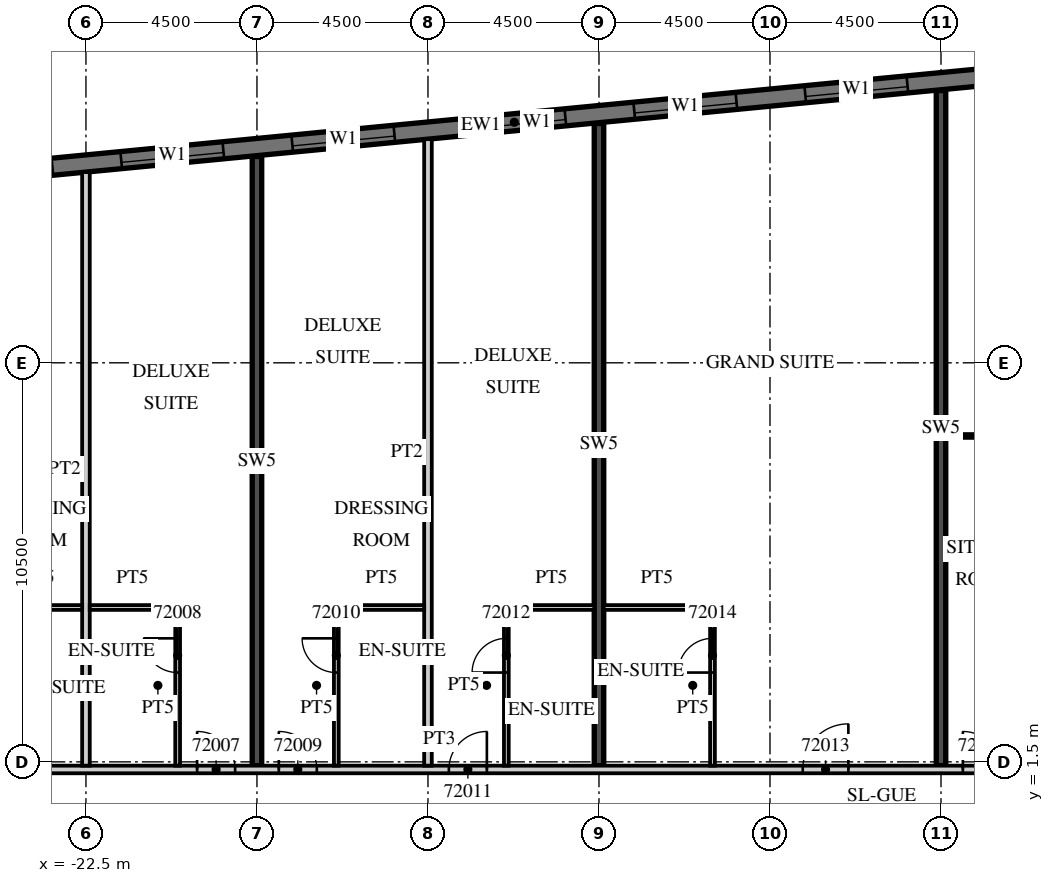
"""IFC4 building model, lengths in metres.
Left out: names, types, materials, properties, quantities, classifications, styles, units other than length and angle.
Written with IfcOpenShell. Run it as: python <this file> out.ifc"""

import sys

from ifc_helpers import new_model, si_unit, direction, frame, frame_2d, origin, place, context, subcontext, project, spatial, rectangle, extrude, element, fill, save


model = new_model("IFC4")
c1 = context("Model", 3, precision=1e-05, world=origin(), true_north=direction((0.0, 1.0)))
c2 = subcontext(c1, "Body", "Model", "MODEL_VIEW")
j1 = project(units=[si_unit("LENGTHUNIT", "METRE"), si_unit("PLANEANGLEUNIT", "RADIAN")], contexts=[c1])
p1 = place(None, origin())
s1 = spatial("IfcSite", under=j1, at=p1, CompositionType="ELEMENT")
p2 = place(p1, origin())
s2 = spatial("IfcBuilding", under=s1, at=p2, CompositionType="ELEMENT")
p3 = place(p2, frame((0.0, 0.0, 288.3)))
s3 = spatial("IfcBuildingStorey", under=s2, at=p3, CompositionType="ELEMENT", Elevation=288.3)
p4 = place(p3, frame((-18.0, 1.4, 0.0), z_axis=(0.0, 0.0, 1.0), x_axis=(0.0, 1.0, 0.0)))
e1 = element("IfcWall", 1, at=p4, inside=s3, PredefinedType="SHEAR", context=c2, shape_type="SweptSolid", body=[
    extrude(rectangle(XDim=16.03, YDim=0.25, at=frame_2d((8.015, 0.0))), origin(), (0.0, 0.0, 1.0), 3.3),
])
p5 = place(p3, frame((-9.0, 1.4, 0.0), z_axis=(0.0, 0.0, 1.0), x_axis=(0.0, 1.0, 0.0)))
e2 = element("IfcWall", 2, at=p5, inside=s3, PredefinedType="SHEAR", context=c2, shape_type="SweptSolid", body=[
    extrude(rectangle(XDim=16.896, YDim=0.25, at=frame_2d((8.448, 0.0))), origin(), (0.0, 0.0, 1.0), 3.3),
])
p6 = place(p3, frame((0.0, 1.4, 0.0), z_axis=(0.0, 0.0, 1.0), x_axis=(0.0, 1.0, 0.0)))
e3 = element("IfcWall", 3, at=p6, inside=s3, PredefinedType="SHEAR", context=c2, shape_type="SweptSolid", body=[
    extrude(rectangle(XDim=17.763, YDim=0.25, at=frame_2d((8.881, 0.0))), origin(), (0.0, 0.0, 1.0), 3.3),
])
p7 = place(p3, frame((13.521, 20.713, 0.0), z_axis=(0.0, 0.0, 1.0), x_axis=(-0.995396277313, -0.095844932638, 0.0)))
e4 = element("IfcWall", 4, at=p7, inside=s3, PredefinedType="SOLIDWALL", context=c2, shape_type="SweptSolid", body=[
    extrude(rectangle(XDim=51.495, YDim=0.45, at=frame_2d((25.748, 0.0))), origin(), (0.0, 0.0, 1.0), 3.02),
])
p8 = place(p7, frame((0.91, 0.0, 0.45)))
e5 = element("IfcOpeningElement", 5, at=p8, cuts=e4, PredefinedType="OPENING", context=c2, shape_type="SweptSolid", body=[
    extrude(rectangle(XDim=2.7, YDim=2.25, at=frame_2d((1.35, 1.125))), frame((0.0, 0.235, 0.0), z_axis=(0.0, -1.0, 0.0), x_axis=(1.0, 0.0, 0.0)), (0.0, 0.0, 1.0), 0.47),
])
p9 = place(p7, frame((5.431, 0.0, 0.45)))
e6 = element("IfcOpeningElement", 6, at=p9, cuts=e4, PredefinedType="OPENING", context=c2, shape_type="SweptSolid", body=[
    extrude(rectangle(XDim=2.7, YDim=2.25, at=frame_2d((1.35, 1.125))), frame((0.0, 0.235, 0.0), z_axis=(0.0, -1.0, 0.0), x_axis=(1.0, 0.0, 0.0)), (0.0, 0.0, 1.0), 0.47),
])
p10 = place(p7, frame((9.952, 0.0, 0.45)))
e7 = element("IfcOpeningElement", 7, at=p10, cuts=e4, PredefinedType="OPENING", context=c2, shape_type="SweptSolid", body=[
    extrude(rectangle(XDim=2.7, YDim=2.25, at=frame_2d((1.35, 1.125))), frame((0.0, 0.235, 0.0), z_axis=(0.0, -1.0, 0.0), x_axis=(1.0, 0.0, 0.0)), (0.0, 0.0, 1.0), 0.47),
])
p11 = place(p7, frame((14.473, 0.0, 0.45)))
e8 = element("IfcOpeningElement", 8, at=p11, cuts=e4, PredefinedType="OPENING", context=c2, shape_type="SweptSolid", body=[
    extrude(rectangle(XDim=2.7, YDim=2.25, at=frame_2d((1.35, 1.125))), frame((0.0, 0.235, 0.0), z_axis=(0.0, -1.0, 0.0), x_axis=(1.0, 0.0, 0.0)), (0.0, 0.0, 1.0), 0.47),
])
p12 = place(p7, frame((18.994, 0.0, 0.45)))
e9 = element("IfcOpeningElement", 9, at=p12, cuts=e4, PredefinedType="OPENING", context=c2, shape_type="SweptSolid", body=[
    extrude(rectangle(XDim=2.7, YDim=2.25, at=frame_2d((1.35, 1.125))), frame((0.0, 0.235, 0.0), z_axis=(0.0, -1.0, 0.0), x_axis=(1.0, 0.0, 0.0)), (0.0, 0.0, 1.0), 0.47),
])
p13 = place(p7, frame((23.514, 0.0, 0.45)))
e10 = element("IfcOpeningElement", 10, at=p13, cuts=e4, PredefinedType="OPENING", context=c2, shape_type="SweptSolid", body=[
    extrude(rectangle(XDim=2.7, YDim=2.25, at=frame_2d((1.35, 1.125))), frame((0.0, 0.235, 0.0), z_axis=(0.0, -1.0, 0.0), x_axis=(1.0, 0.0, 0.0)), (0.0, 0.0, 1.0), 0.47),
])
p14 = place(p7, frame((28.035, 0.0, 0.45)))
e11 = element("IfcOpeningElement", 11, at=p14, cuts=e4, PredefinedType="OPENING", context=c2, shape_type="SweptSolid", body=[
    extrude(rectangle(XDim=2.7, YDim=2.25, at=frame_2d((1.35, 1.125))), frame((0.0, 0.235, 0.0), z_axis=(0.0, -1.0, 0.0), x_axis=(1.0, 0.0, 0.0)), (0.0, 0.0, 1.0), 0.47),
])
p15 = place(p7, frame((32.556, 0.0, 0.45)))
e12 = element("IfcOpeningElement", 12, at=p15, cuts=e4, PredefinedType="OPENING", context=c2, shape_type="SweptSolid", body=[
    extrude(rectangle(XDim=2.7, YDim=2.25, at=frame_2d((1.35, 1.125))), frame((0.0, 0.235, 0.0), z_axis=(0.0, -1.0, 0.0), x_axis=(1.0, 0.0, 0.0)), (0.0, 0.0, 1.0), 0.47),
])
p16 = place(p7, frame((37.077, 0.0, 0.45)))
e13 = element("IfcOpeningElement", 13, at=p16, cuts=e4, PredefinedType="OPENING", context=c2, shape_type="SweptSolid", body=[
    extrude(rectangle(XDim=2.7, YDim=2.25, at=frame_2d((1.35, 1.125))), frame((0.0, 0.235, 0.0), z_axis=(0.0, -1.0, 0.0), x_axis=(1.0, 0.0, 0.0)), (0.0, 0.0, 1.0), 0.47),
])
p17 = place(p7, frame((41.598, 0.0, 0.45)))
e14 = element("IfcOpeningElement", 14, at=p17, cuts=e4, PredefinedType="OPENING", context=c2, shape_type="SweptSolid", body=[
    extrude(rectangle(XDim=2.7, YDim=2.25, at=frame_2d((1.35, 1.125))), frame((0.0, 0.235, 0.0), z_axis=(0.0, -1.0, 0.0), x_axis=(1.0, 0.0, 0.0)), (0.0, 0.0, 1.0), 0.47),
])
p18 = place(p7, frame((46.118, 0.0, 0.45)))
e15 = element("IfcOpeningElement", 15, at=p18, cuts=e4, PredefinedType="OPENING", context=c2, shape_type="SweptSolid", body=[
    extrude(rectangle(XDim=2.7, YDim=2.25, at=frame_2d((1.35, 1.125))), frame((0.0, 0.235, 0.0), z_axis=(0.0, -1.0, 0.0), x_axis=(1.0, 0.0, 0.0)), (0.0, 0.0, 1.0), 0.47),
])
p19 = place(p3, frame((-39.909, 1.3, 0.0), z_axis=(0.0, 0.0, 1.0), x_axis=(1.0, 0.0, 0.0)))
e16 = element("IfcWall", 16, at=p19, inside=s3, PredefinedType="PARTITIONING", context=c2, shape_type="SweptSolid", body=[
    extrude(rectangle(XDim=53.409, YDim=0.2, at=frame_2d((26.705, 0.0))), origin(), (0.0, 0.0, 1.0), 3.02),
])
p20 = place(p19, frame((0.255, 0.0, 0.0)))
e17 = element("IfcOpeningElement", 17, at=p20, cuts=e16, PredefinedType="OPENING", context=c2, shape_type="SweptSolid", body=[
    extrude(rectangle(XDim=0.9, YDim=2.1, at=frame_2d((0.45, 1.05))), frame((0.0, 0.11, 0.0), z_axis=(0.0, -1.0, 0.0), x_axis=(1.0, 0.0, 0.0)), (0.0, 0.0, 1.0), 0.22),
])
p21 = place(p19, frame((6.347, 0.0, 0.0)))
e18 = element("IfcOpeningElement", 18, at=p21, cuts=e16, PredefinedType="OPENING", context=c2, shape_type="SweptSolid", body=[
    extrude(rectangle(XDim=1.2, YDim=2.1, at=frame_2d((0.6, 1.05))), frame((0.0, 0.11, 0.0), z_axis=(0.0, -1.0, 0.0), x_axis=(1.0, 0.0, 0.0)), (0.0, 0.0, 1.0), 0.22),
])
p22 = place(p19, frame((13.484, 0.0, 0.0)))
e19 = element("IfcOpeningElement", 19, at=p22, cuts=e16, PredefinedType="OPENING", context=c2, shape_type="SweptSolid", body=[
    extrude(rectangle(XDim=1.0, YDim=2.1, at=frame_2d((0.5, 1.05))), frame((0.0, 0.11, 0.0), z_axis=(0.0, -1.0, 0.0), x_axis=(1.0, 0.0, 0.0)), (0.0, 0.0, 1.0), 0.22),
])
p23 = place(p19, frame((20.334, 0.0, 0.0)))
e20 = element("IfcOpeningElement", 20, at=p23, cuts=e16, PredefinedType="OPENING", context=c2, shape_type="SweptSolid", body=[
    extrude(rectangle(XDim=1.0, YDim=2.1, at=frame_2d((0.5, 1.05))), frame((0.0, 0.11, 0.0), z_axis=(0.0, -1.0, 0.0), x_axis=(1.0, 0.0, 0.0)), (0.0, 0.0, 1.0), 0.22),
])
p24 = place(p19, frame((22.484, 0.0, 0.0)))
e21 = element("IfcOpeningElement", 21, at=p24, cuts=e16, PredefinedType="OPENING", context=c2, shape_type="SweptSolid", body=[
    extrude(rectangle(XDim=1.0, YDim=2.1, at=frame_2d((0.5, 1.05))), frame((0.0, 0.11, 0.0), z_axis=(0.0, -1.0, 0.0), x_axis=(1.0, 0.0, 0.0)), (0.0, 0.0, 1.0), 0.22),
])
p25 = place(p19, frame((26.959, 0.0, 0.0)))
e22 = element("IfcOpeningElement", 22, at=p25, cuts=e16, PredefinedType="OPENING", context=c2, shape_type="SweptSolid", body=[
    extrude(rectangle(XDim=1.0, YDim=2.1, at=frame_2d((0.5, 1.05))), frame((0.0, 0.11, 0.0), z_axis=(0.0, -1.0, 0.0), x_axis=(1.0, 0.0, 0.0)), (0.0, 0.0, 1.0), 0.22),
])
p26 = place(p19, frame((36.271, 0.0, 0.0)))
e23 = element("IfcOpeningElement", 23, at=p26, cuts=e16, PredefinedType="OPENING", context=c2, shape_type="SweptSolid", body=[
    extrude(rectangle(XDim=1.2, YDim=2.1, at=frame_2d((0.6, 1.05))), frame((0.0, 0.11, 0.0), z_axis=(0.0, -1.0, 0.0), x_axis=(1.0, 0.0, 0.0)), (0.0, 0.0, 1.0), 0.22),
])
p27 = place(p19, frame((40.484, 0.0, 0.0)))
e24 = element("IfcOpeningElement", 24, at=p27, cuts=e16, PredefinedType="OPENING", context=c2, shape_type="SweptSolid", body=[
    extrude(rectangle(XDim=1.0, YDim=2.1, at=frame_2d((0.5, 1.05))), frame((0.0, 0.11, 0.0), z_axis=(0.0, -1.0, 0.0), x_axis=(1.0, 0.0, 0.0)), (0.0, 0.0, 1.0), 0.22),
])
p28 = place(p19, frame((44.959, 0.0, 0.0)))
e25 = element("IfcOpeningElement", 25, at=p28, cuts=e16, PredefinedType="OPENING", context=c2, shape_type="SweptSolid", body=[
    extrude(rectangle(XDim=1.0, YDim=2.1, at=frame_2d((0.5, 1.05))), frame((0.0, 0.11, 0.0), z_axis=(0.0, -1.0, 0.0), x_axis=(1.0, 0.0, 0.0)), (0.0, 0.0, 1.0), 0.22),
])
p29 = place(p19, frame((51.834, 0.0, 0.0)))
e26 = element("IfcOpeningElement", 26, at=p29, cuts=e16, PredefinedType="OPENING", context=c2, shape_type="SweptSolid", body=[
    extrude(rectangle(XDim=1.0, YDim=2.1, at=frame_2d((0.5, 1.05))), frame((0.0, 0.11, 0.0), z_axis=(0.0, -1.0, 0.0), x_axis=(1.0, 0.0, 0.0)), (0.0, 0.0, 1.0), 0.22),
])
p30 = place(p3, frame((-22.5, 1.4, 0.0), z_axis=(0.0, 0.0, 1.0), x_axis=(0.0, 1.0, 0.0)))
e27 = element("IfcWall", 27, at=p30, inside=s3, PredefinedType="PARTITIONING", context=c2, shape_type="SweptSolid", body=[
    extrude(rectangle(XDim=15.618, YDim=0.2, at=frame_2d((7.809, 0.0))), origin(), (0.0, 0.0, 1.0), 3.02),
])
p31 = place(p3, frame((-24.85, 5.562, 0.0), z_axis=(0.0, 0.0, 1.0), x_axis=(1.0, 0.0, 0.0)))
e28 = element("IfcWall", 28, at=p31, inside=s3, PredefinedType="PARTITIONING", context=c2, shape_type="SweptSolid", body=[
    extrude(rectangle(XDim=2.25, YDim=0.125, at=frame_2d((1.125, 0.0))), origin(), (0.0, 0.0, 1.0), 3.02),
])
p32 = place(p3, frame((-20.087, 1.4, 0.0), z_axis=(0.0, 0.0, 1.0), x_axis=(0.0, 1.0, 0.0)))
e29 = element("IfcWall", 29, at=p32, inside=s3, PredefinedType="PARTITIONING", context=c2, shape_type="SweptSolid", body=[
    extrude(rectangle(XDim=4.225, YDim=0.125, at=frame_2d((2.113, 0.0))), origin(), (0.0, 0.0, 1.0), 3.02),
])
p33 = place(p32, frame((2.45, 0.0, 0.0)))
e30 = element("IfcOpeningElement", 30, at=p33, cuts=e29, PredefinedType="OPENING", context=c2, shape_type="SweptSolid", body=[
    extrude(rectangle(XDim=0.9, YDim=2.1, at=frame_2d((0.45, 1.05))), frame((0.0, 0.073, 0.0), z_axis=(0.0, -1.0, 0.0), x_axis=(1.0, 0.0, 0.0)), (0.0, 0.0, 1.0), 0.145),
])
p34 = place(p3, frame((-22.4, 5.562, 0.0), z_axis=(0.0, 0.0, 1.0), x_axis=(1.0, 0.0, 0.0)))
e31 = element("IfcWall", 31, at=p34, inside=s3, PredefinedType="PARTITIONING", context=c2, shape_type="SweptSolid", body=[
    extrude(rectangle(XDim=2.25, YDim=0.125, at=frame_2d((1.125, 0.0))), origin(), (0.0, 0.0, 1.0), 3.02),
])
p35 = place(p3, frame((-13.5, 1.4, 0.0), z_axis=(0.0, 0.0, 1.0), x_axis=(0.0, 1.0, 0.0)))
e32 = element("IfcWall", 32, at=p35, inside=s3, PredefinedType="PARTITIONING", context=c2, shape_type="SweptSolid", body=[
    extrude(rectangle(XDim=16.485, YDim=0.2, at=frame_2d((8.243, 0.0))), origin(), (0.0, 0.0, 1.0), 3.02),
])
p36 = place(p3, frame((-15.912, 1.4, 0.0), z_axis=(0.0, 0.0, 1.0), x_axis=(0.0, 1.0, 0.0)))
e33 = element("IfcWall", 33, at=p36, inside=s3, PredefinedType="PARTITIONING", context=c2, shape_type="SweptSolid", body=[
    extrude(rectangle(XDim=4.225, YDim=0.125, at=frame_2d((2.113, 0.0))), origin(), (0.0, 0.0, 1.0), 3.02),
])
p37 = place(p36, frame((2.45, 0.0, 0.0)))
e34 = element("IfcOpeningElement", 34, at=p37, cuts=e33, PredefinedType="OPENING", context=c2, shape_type="SweptSolid", body=[
    extrude(rectangle(XDim=0.9, YDim=2.1, at=frame_2d((0.45, 1.05))), frame((0.0, 0.073, 0.0), z_axis=(0.0, -1.0, 0.0), x_axis=(1.0, 0.0, 0.0)), (0.0, 0.0, 1.0), 0.145),
])
p38 = place(p3, frame((-15.85, 5.562, 0.0), z_axis=(0.0, 0.0, 1.0), x_axis=(1.0, 0.0, 0.0)))
e35 = element("IfcWall", 35, at=p38, inside=s3, PredefinedType="PARTITIONING", context=c2, shape_type="SweptSolid", body=[
    extrude(rectangle(XDim=2.25, YDim=0.125, at=frame_2d((1.125, 0.0))), origin(), (0.0, 0.0, 1.0), 3.02),
])
p39 = place(p3, frame((-11.438, 1.4, 0.0), z_axis=(0.0, 0.0, 1.0), x_axis=(0.0, 1.0, 0.0)))
e36 = element("IfcWall", 36, at=p39, inside=s3, PredefinedType="PARTITIONING", context=c2, shape_type="SweptSolid", body=[
    extrude(rectangle(XDim=4.225, YDim=0.125, at=frame_2d((2.113, 0.0))), origin(), (0.0, 0.0, 1.0), 3.02),
])
p40 = place(p39, frame((2.45, 0.0, 0.0)))
e37 = element("IfcOpeningElement", 37, at=p40, cuts=e36, PredefinedType="OPENING", context=c2, shape_type="SweptSolid", body=[
    extrude(rectangle(XDim=0.9, YDim=2.1, at=frame_2d((0.45, 1.05))), frame((0.0, 0.073, 0.0), z_axis=(0.0, -1.0, 0.0), x_axis=(1.0, 0.0, 0.0)), (0.0, 0.0, 1.0), 0.145),
])
p41 = place(p3, frame((-11.375, 5.562, 0.0), z_axis=(0.0, 0.0, 1.0), x_axis=(1.0, 0.0, 0.0)))
e38 = element("IfcWall", 38, at=p41, inside=s3, PredefinedType="PARTITIONING", context=c2, shape_type="SweptSolid", body=[
    extrude(rectangle(XDim=2.25, YDim=0.125, at=frame_2d((1.125, 0.0))), origin(), (0.0, 0.0, 1.0), 3.02),
])
p42 = place(p3, frame((-6.013, 1.4, 0.0), z_axis=(0.0, 0.0, 1.0), x_axis=(0.0, 1.0, 0.0)))
e39 = element("IfcWall", 39, at=p42, inside=s3, PredefinedType="PARTITIONING", context=c2, shape_type="SweptSolid", body=[
    extrude(rectangle(XDim=4.225, YDim=0.125, at=frame_2d((2.113, 0.0))), origin(), (0.0, 0.0, 1.0), 3.02),
])
p43 = place(p42, frame((2.45, 0.0, 0.0)))
e40 = element("IfcOpeningElement", 40, at=p43, cuts=e39, PredefinedType="OPENING", context=c2, shape_type="SweptSolid", body=[
    extrude(rectangle(XDim=0.9, YDim=2.1, at=frame_2d((0.45, 1.05))), frame((0.0, 0.073, 0.0), z_axis=(0.0, -1.0, 0.0), x_axis=(1.0, 0.0, 0.0)), (0.0, 0.0, 1.0), 0.145),
])
p44 = place(p3, frame((-8.875, 5.562, 0.0), z_axis=(0.0, 0.0, 1.0), x_axis=(1.0, 0.0, 0.0)))
e41 = element("IfcWall", 41, at=p44, inside=s3, PredefinedType="PARTITIONING", context=c2, shape_type="SweptSolid", body=[
    extrude(rectangle(XDim=2.8, YDim=0.125, at=frame_2d((1.4, 0.0))), origin(), (0.0, 0.0, 1.0), 3.02),
])
p45 = place(p3, frame((0.125, 10.075, 0.0), z_axis=(0.0, 0.0, 1.0), x_axis=(1.0, 0.0, 0.0)))
e42 = element("IfcWall", 42, at=p45, inside=s3, PredefinedType="PARTITIONING", context=c2, shape_type="SweptSolid", body=[
    extrude(rectangle(XDim=4.275, YDim=0.1, at=frame_2d((2.137, 0.0))), origin(), (0.0, 0.0, 1.0), 3.02),
])
p46 = place(p45, frame((1.988, 0.0, 0.0)))
e43 = element("IfcOpeningElement", 43, at=p46, cuts=e42, PredefinedType="OPENING", context=c2, shape_type="SweptSolid", body=[
    extrude(rectangle(XDim=1.5, YDim=2.1, at=frame_2d((0.75, 1.05))), frame((0.0, 0.06, 0.0), z_axis=(0.0, -1.0, 0.0), x_axis=(1.0, 0.0, 0.0)), (0.0, 0.0, 1.0), 0.12),
])
p47 = place(p11, origin())
e44 = element("IfcWindow", 44, at=p47, inside=s3, PartitioningType="SINGLE_PANEL", PredefinedType="WINDOW", context=c2, shape_type="SweptSolid", body=[
    extrude(rectangle(XDim=2.7, YDim=2.25, at=frame_2d((1.35, 1.125))), frame((0.0, 0.09, 0.0), z_axis=(0.0, -1.0, 0.0), x_axis=(1.0, 0.0, 0.0)), (0.0, 0.0, 1.0), 0.06),
])
fill(e8, e44)
p48 = place(p12, origin())
e45 = element("IfcWindow", 45, at=p48, inside=s3, PartitioningType="SINGLE_PANEL", PredefinedType="WINDOW", context=c2, shape_type="SweptSolid", body=[
    extrude(rectangle(XDim=2.7, YDim=2.25, at=frame_2d((1.35, 1.125))), frame((0.0, 0.09, 0.0), z_axis=(0.0, -1.0, 0.0), x_axis=(1.0, 0.0, 0.0)), (0.0, 0.0, 1.0), 0.06),
])
fill(e9, e45)
p49 = place(p13, origin())
e46 = element("IfcWindow", 46, at=p49, inside=s3, PartitioningType="SINGLE_PANEL", PredefinedType="WINDOW", context=c2, shape_type="SweptSolid", body=[
    extrude(rectangle(XDim=2.7, YDim=2.25, at=frame_2d((1.35, 1.125))), frame((0.0, 0.09, 0.0), z_axis=(0.0, -1.0, 0.0), x_axis=(1.0, 0.0, 0.0)), (0.0, 0.0, 1.0), 0.06),
])
fill(e10, e46)
p50 = place(p14, origin())
e47 = element("IfcWindow", 47, at=p50, inside=s3, PartitioningType="SINGLE_PANEL", PredefinedType="WINDOW", context=c2, shape_type="SweptSolid", body=[
    extrude(rectangle(XDim=2.7, YDim=2.25, at=frame_2d((1.35, 1.125))), frame((0.0, 0.09, 0.0), z_axis=(0.0, -1.0, 0.0), x_axis=(1.0, 0.0, 0.0)), (0.0, 0.0, 1.0), 0.06),
])
fill(e11, e47)
p51 = place(p15, origin())
e48 = element("IfcWindow", 48, at=p51, inside=s3, PartitioningType="SINGLE_PANEL", PredefinedType="WINDOW", context=c2, shape_type="SweptSolid", body=[
    extrude(rectangle(XDim=2.7, YDim=2.25, at=frame_2d((1.35, 1.125))), frame((0.0, 0.09, 0.0), z_axis=(0.0, -1.0, 0.0), x_axis=(1.0, 0.0, 0.0)), (0.0, 0.0, 1.0), 0.06),
])
fill(e12, e48)
p52 = place(p16, origin())
e49 = element("IfcWindow", 49, at=p52, inside=s3, PartitioningType="SINGLE_PANEL", PredefinedType="WINDOW", context=c2, shape_type="SweptSolid", body=[
    extrude(rectangle(XDim=2.7, YDim=2.25, at=frame_2d((1.35, 1.125))), frame((0.0, 0.09, 0.0), z_axis=(0.0, -1.0, 0.0), x_axis=(1.0, 0.0, 0.0)), (0.0, 0.0, 1.0), 0.06),
])
fill(e13, e49)
p53 = place(p23, origin())
e50 = element("IfcDoor", 50, at=p53, inside=s3, OperationType="SINGLE_SWING_LEFT", PredefinedType="DOOR", context=c2, shape_type="SweptSolid", body=[
    extrude(rectangle(XDim=1.0, YDim=2.1, at=frame_2d((0.5, 1.05))), frame((0.0, 0.025, 0.0), z_axis=(0.0, -1.0, 0.0), x_axis=(1.0, 0.0, 0.0)), (0.0, 0.0, 1.0), 0.05),
])
fill(e20, e50)
p54 = place(p33, origin())
e51 = element("IfcDoor", 51, at=p54, inside=s3, OperationType="SINGLE_SWING_RIGHT", PredefinedType="DOOR", context=c2, shape_type="SweptSolid", body=[
    extrude(rectangle(XDim=0.9, YDim=2.1, at=frame_2d((0.45, 1.05))), frame((0.0, 0.025, 0.0), z_axis=(0.0, -1.0, 0.0), x_axis=(1.0, 0.0, 0.0)), (0.0, 0.0, 1.0), 0.05),
])
fill(e30, e51)
p55 = place(p24, origin())
e52 = element("IfcDoor", 52, at=p55, inside=s3, OperationType="SINGLE_SWING_LEFT", PredefinedType="DOOR", context=c2, shape_type="SweptSolid", body=[
    extrude(rectangle(XDim=1.0, YDim=2.1, at=frame_2d((0.5, 1.05))), frame((0.0, 0.025, 0.0), z_axis=(0.0, -1.0, 0.0), x_axis=(1.0, 0.0, 0.0)), (0.0, 0.0, 1.0), 0.05),
])
fill(e21, e52)
p56 = place(p37, origin())
e53 = element("IfcDoor", 53, at=p56, inside=s3, OperationType="SINGLE_SWING_RIGHT", PredefinedType="DOOR", context=c2, shape_type="SweptSolid", body=[
    extrude(rectangle(XDim=0.9, YDim=2.1, at=frame_2d((0.45, 1.05))), frame((0.0, 0.025, 0.0), z_axis=(0.0, -1.0, 0.0), x_axis=(1.0, 0.0, 0.0)), (0.0, 0.0, 1.0), 0.05),
])
fill(e34, e53)
p57 = place(p25, origin())
e54 = element("IfcDoor", 54, at=p57, inside=s3, OperationType="SINGLE_SWING_RIGHT", PredefinedType="DOOR", context=c2, shape_type="SweptSolid", body=[
    extrude(rectangle(XDim=1.0, YDim=2.1, at=frame_2d((0.5, 1.05))), frame((0.0, 0.025, 0.0), z_axis=(0.0, -1.0, 0.0), x_axis=(1.0, 0.0, 0.0)), (0.0, 0.0, 1.0), 0.05),
])
fill(e22, e54)
p58 = place(p40, origin())
e55 = element("IfcDoor", 55, at=p58, inside=s3, OperationType="SINGLE_SWING_LEFT", PredefinedType="DOOR", context=c2, shape_type="SweptSolid", body=[
    extrude(rectangle(XDim=0.9, YDim=2.1, at=frame_2d((0.45, 1.05))), frame((0.0, 0.025, 0.0), z_axis=(0.0, -1.0, 0.0), x_axis=(1.0, 0.0, 0.0)), (0.0, 0.0, 1.0), 0.05),
])
fill(e37, e55)
p59 = place(p26, origin())
e56 = element("IfcDoor", 56, at=p59, inside=s3, OperationType="SINGLE_SWING_RIGHT", PredefinedType="DOOR", context=c2, shape_type="SweptSolid", body=[
    extrude(rectangle(XDim=1.2, YDim=2.1, at=frame_2d((0.6, 1.05))), frame((0.0, 0.025, 0.0), z_axis=(0.0, -1.0, 0.0), x_axis=(1.0, 0.0, 0.0)), (0.0, 0.0, 1.0), 0.05),
])
fill(e23, e56)
p60 = place(p43, origin())
e57 = element("IfcDoor", 57, at=p60, inside=s3, OperationType="SINGLE_SWING_LEFT", PredefinedType="DOOR", context=c2, shape_type="SweptSolid", body=[
    extrude(rectangle(XDim=0.9, YDim=2.1, at=frame_2d((0.45, 1.05))), frame((0.0, 0.025, 0.0), z_axis=(0.0, -1.0, 0.0), x_axis=(1.0, 0.0, 0.0)), (0.0, 0.0, 1.0), 0.05),
])
fill(e40, e57)
p61 = place(p27, origin())
e58 = element("IfcDoor", 58, at=p61, inside=s3, OperationType="SINGLE_SWING_LEFT", PredefinedType="DOOR", context=c2, shape_type="SweptSolid", body=[
    extrude(rectangle(XDim=1.0, YDim=2.1, at=frame_2d((0.5, 1.05))), frame((0.0, 0.025, 0.0), z_axis=(0.0, -1.0, 0.0), x_axis=(1.0, 0.0, 0.0)), (0.0, 0.0, 1.0), 0.05),
])
fill(e24, e58)
save(model, sys.argv[1])
